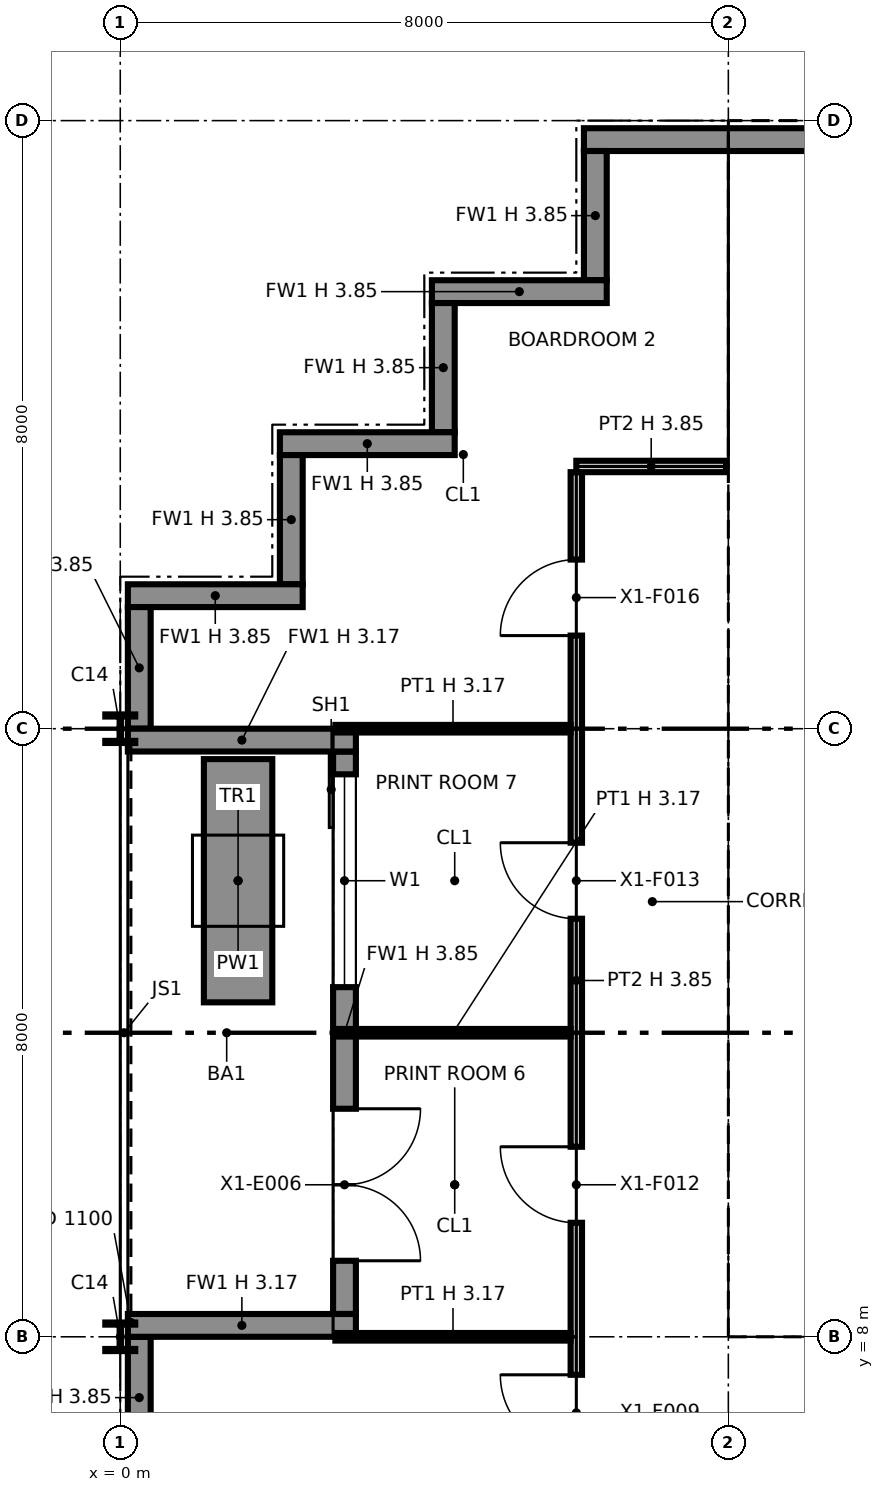
"""IFC4 building model, lengths in metres.
Left out: names, types, materials, properties, quantities, classifications, styles, units other than length and angle.
Written with IfcOpenShell. Run it as: python <this file> out.ifc"""

import sys

from ifc_helpers import new_model, si_unit, direction, frame, frame_2d, origin, origin_2d, place, context, subcontext, project, spatial, polyline, rectangle, i_section, outline, extrude, element, fill, save


model = new_model("IFC4")
c1 = context("Model", 3, precision=1e-05, world=origin(), true_north=direction((0.0, 1.0)))
c2 = subcontext(c1, "Body", "Model", "MODEL_VIEW")
j1 = project(units=[si_unit("LENGTHUNIT", "METRE"), si_unit("PLANEANGLEUNIT", "RADIAN")], contexts=[c1])
p1 = place(None, origin())
s1 = spatial("IfcSite", under=j1, at=p1, CompositionType="ELEMENT")
p2 = place(p1, origin())
s2 = spatial("IfcBuilding", under=s1, at=p2, CompositionType="ELEMENT")
p3 = place(p2, frame((0.0, 0.0, 251.0)))
s3 = spatial("IfcBuildingStorey", under=s2, at=p3, CompositionType="ELEMENT", Elevation=251.0)
for number, where, z_axis, x_axis in (
    (1, (0.0, 8.0, 0.0), (0.0, 0.0, 1.0), (1.0, 0.0, 0.0)),
    (2, (0.0, 16.0, 0.0), (0.0, 0.0, 1.0), (1.0, 0.0, 0.0)),
):
    element("IfcColumn", number, at=place(p3, frame(where, z_axis=z_axis, x_axis=x_axis)), inside=s3, PredefinedType="COLUMN", context=c2, shape_type="SweptSolid", body=[
        extrude(i_section(OverallWidth=0.394, OverallDepth=0.376, WebThickness=0.017, FlangeThickness=0.028, at=origin_2d()), origin(), (0.0, 0.0, 1.0), 3.85),
    ])
for number, where, z_axis, x_axis in (
    (3, (8.0, 8.0, 0.0), (0.0, 0.0, 1.0), (1.0, 0.0, 0.0)),
    (4, (8.0, 16.0, 0.0), (0.0, 0.0, 1.0), (1.0, 0.0, 0.0)),
):
    element("IfcColumn", number, at=place(p3, frame(where, z_axis=z_axis, x_axis=x_axis)), inside=s3, PredefinedType="COLUMN", context=c2, shape_type="SweptSolid", body=[
        extrude(i_section(OverallWidth=0.371, OverallDepth=0.361, WebThickness=0.012, FlangeThickness=0.02, at=origin_2d()), origin(), (0.0, 0.0, 1.0), 3.85),
    ])
p4 = place(p3, frame((8.0, 24.0, 0.0), z_axis=(0.0, 0.0, 1.0), x_axis=(1.0, 0.0, 0.0)))
e5 = element("IfcColumn", 5, at=p4, inside=s3, PredefinedType="COLUMN", context=c2, shape_type="SweptSolid", body=[
    extrude(i_section(OverallWidth=0.401, OverallDepth=0.399, WebThickness=0.025, FlangeThickness=0.04, at=origin_2d()), origin(), (0.0, 0.0, 1.0), 3.85),
])
p5 = place(p3, frame((32.0, 23.75, 0.0), z_axis=(0.0, 0.0, 1.0), x_axis=(-1.0, 0.0, 0.0)))
e6 = element("IfcWall", 6, at=p5, inside=s3, PredefinedType="SOLIDWALL", context=c2, shape_type="SweptSolid", body=[
    extrude(rectangle(XDim=25.9, YDim=0.3, at=frame_2d((12.95, 0.0))), origin(), (0.0, 0.0, 1.0), 3.85),
])
p6 = place(p3, frame((6.25, 23.6, 0.0), z_axis=(0.0, 0.0, 1.0), x_axis=(0.0, -1.0, 0.0)))
e7 = element("IfcWall", 7, at=p6, inside=s3, PredefinedType="SOLIDWALL", context=c2, shape_type="SweptSolid", body=[
    extrude(rectangle(XDim=1.7, YDim=0.3, at=frame_2d((0.85, 0.0))), origin(), (0.0, 0.0, 1.0), 3.85),
])
p7 = place(p3, frame((6.4, 21.75, 0.0), z_axis=(0.0, 0.0, 1.0), x_axis=(-1.0, 0.0, 0.0)))
e8 = element("IfcWall", 8, at=p7, inside=s3, PredefinedType="SOLIDWALL", context=c2, shape_type="SweptSolid", body=[
    extrude(rectangle(XDim=2.3, YDim=0.3, at=frame_2d((1.15, 0.0))), origin(), (0.0, 0.0, 1.0), 3.85),
])
p8 = place(p3, frame((4.25, 21.6, 0.0), z_axis=(0.0, 0.0, 1.0), x_axis=(0.0, -1.0, 0.0)))
e9 = element("IfcWall", 9, at=p8, inside=s3, PredefinedType="SOLIDWALL", context=c2, shape_type="SweptSolid", body=[
    extrude(rectangle(XDim=1.7, YDim=0.3, at=frame_2d((0.85, 0.0))), origin(), (0.0, 0.0, 1.0), 3.85),
])
p9 = place(p3, frame((4.4, 19.75, 0.0), z_axis=(0.0, 0.0, 1.0), x_axis=(-1.0, 0.0, 0.0)))
e10 = element("IfcWall", 10, at=p9, inside=s3, PredefinedType="SOLIDWALL", context=c2, shape_type="SweptSolid", body=[
    extrude(rectangle(XDim=2.3, YDim=0.3, at=frame_2d((1.15, 0.0))), origin(), (0.0, 0.0, 1.0), 3.85),
])
p10 = place(p3, frame((2.25, 19.6, 0.0), z_axis=(0.0, 0.0, 1.0), x_axis=(0.0, -1.0, 0.0)))
e11 = element("IfcWall", 11, at=p10, inside=s3, PredefinedType="SOLIDWALL", context=c2, shape_type="SweptSolid", body=[
    extrude(rectangle(XDim=1.7, YDim=0.3, at=frame_2d((0.85, 0.0))), origin(), (0.0, 0.0, 1.0), 3.85),
])
p11 = place(p3, frame((2.4, 17.75, 0.0), z_axis=(0.0, 0.0, 1.0), x_axis=(-1.0, 0.0, 0.0)))
e12 = element("IfcWall", 12, at=p11, inside=s3, PredefinedType="SOLIDWALL", context=c2, shape_type="SweptSolid", body=[
    extrude(rectangle(XDim=2.3, YDim=0.3, at=frame_2d((1.15, 0.0))), origin(), (0.0, 0.0, 1.0), 3.85),
])
p12 = place(p3, frame((0.25, 17.6, 0.0), z_axis=(0.0, 0.0, 1.0), x_axis=(0.0, -1.0, 0.0)))
e13 = element("IfcWall", 13, at=p12, inside=s3, PredefinedType="SOLIDWALL", context=c2, shape_type="SweptSolid", body=[
    extrude(rectangle(XDim=1.6, YDim=0.3, at=frame_2d((0.8, 0.0))), origin(), (0.0, 0.0, 1.0), 3.85),
])
p13 = place(p3, frame((2.95, 15.7, 0.0), z_axis=(0.0, 0.0, 1.0), x_axis=(0.0, -1.0, 0.0)))
e14 = element("IfcWall", 14, at=p13, inside=s3, PredefinedType="SOLIDWALL", context=c2, shape_type="SweptSolid", body=[
    extrude(rectangle(XDim=7.4, YDim=0.3, at=frame_2d((3.7, 0.0))), origin(), (0.0, 0.0, 1.0), 3.85),
])
p14 = place(p13, frame((0.3, 0.0, 0.9)))
e15 = element("IfcOpeningElement", 15, at=p14, cuts=e14, PredefinedType="OPENING", context=c2, shape_type="SweptSolid", body=[
    extrude(rectangle(XDim=2.8, YDim=2.2, at=frame_2d((1.4, 1.1))), frame((0.0, 0.16, 0.0), z_axis=(0.0, -1.0, 0.0), x_axis=(1.0, 0.0, 0.0)), (0.0, 0.0, 1.0), 0.32),
])
p15 = place(p13, frame((4.7, 0.0, 0.0)))
e16 = element("IfcOpeningElement", 16, at=p15, cuts=e14, PredefinedType="OPENING", context=c2, shape_type="SweptSolid", body=[
    extrude(rectangle(XDim=2.0, YDim=2.4, at=frame_2d((1.0, 1.2))), frame((0.0, 0.16, 0.0), z_axis=(0.0, -1.0, 0.0), x_axis=(1.0, 0.0, 0.0)), (0.0, 0.0, 1.0), 0.32),
])
for number, where, z_axis, x_axis in (
    (17, (0.1, 15.85, 0.0), (0.0, 0.0, 1.0), (1.0, 0.0, 0.0)),
    (18, (0.1, 8.15, 0.0), (0.0, 0.0, 1.0), (1.0, 0.0, 0.0)),
):
    element("IfcWall", number, at=place(p3, frame(where, z_axis=z_axis, x_axis=x_axis)), inside=s3, PredefinedType="SOLIDWALL", context=c2, shape_type="SweptSolid", body=[
        extrude(rectangle(XDim=3.0, YDim=0.3, at=frame_2d((1.5, 0.0))), origin(), (0.0, 0.0, 1.0), 3.171),
    ])
p16 = place(p3, frame((0.25, 8.0, 0.0), z_axis=(0.0, 0.0, 1.0), x_axis=(0.0, -1.0, 0.0)))
e19 = element("IfcWall", 19, at=p16, inside=s3, PredefinedType="SOLIDWALL", context=c2, shape_type="SweptSolid", body=[
    extrude(rectangle(XDim=1.6, YDim=0.3, at=frame_2d((0.8, 0.0))), origin(), (0.0, 0.0, 1.0), 3.85),
])
p17 = place(p3, frame((1.55, 15.6, 0.0), z_axis=(0.0, 0.0, 1.0), x_axis=(0.0, -1.0, 0.0)))
e20 = element("IfcWall", 20, at=p17, inside=s3, PredefinedType="SOLIDWALL", context=c2, shape_type="SweptSolid", body=[
    extrude(rectangle(XDim=3.2, YDim=0.9, at=frame_2d((1.6, 0.0))), origin(), (0.0, 0.0, 1.0), 0.6),
])
p18 = place(p3, frame((8.65, 8.75, 0.0), z_axis=(0.0, 0.0, 1.0), x_axis=(1.0, 0.0, 0.0)))
e21 = element("IfcWall", 21, at=p18, inside=s3, PredefinedType="PARTITIONING", context=c2, shape_type="SweptSolid", body=[
    extrude(outline(polyline([(0.0, 0.0), (14.7, 0.0), (14.7, 3.85), (7.438, 3.85), (7.438, 3.308), (7.262, 3.308), (7.261, 3.85), (0.0, 3.85), (0.0, 0.0)])), frame((0.0, 0.1, 0.0), z_axis=(0.0, -1.0, 0.0), x_axis=(1.0, 0.0, 0.0)), (0.0, 0.0, 1.0), 0.2),
])
p19 = place(p18, frame((1.3, 0.0, 0.0)))
e22 = element("IfcOpeningElement", 22, at=p19, cuts=e21, PredefinedType="OPENING", context=c2, shape_type="SweptSolid", body=[
    extrude(rectangle(XDim=1.4, YDim=2.1, at=frame_2d((0.7, 1.05))), frame((0.0, 0.11, 0.0), z_axis=(0.0, -1.0, 0.0), x_axis=(1.0, 0.0, 0.0)), (0.0, 0.0, 1.0), 0.22),
])
p20 = place(p18, frame((4.6, 0.0, 0.0)))
e23 = element("IfcOpeningElement", 23, at=p20, cuts=e21, PredefinedType="OPENING", context=c2, shape_type="SweptSolid", body=[
    extrude(rectangle(XDim=1.4, YDim=2.1, at=frame_2d((0.7, 1.05))), frame((0.0, 0.11, 0.0), z_axis=(0.0, -1.0, 0.0), x_axis=(1.0, 0.0, 0.0)), (0.0, 0.0, 1.0), 0.22),
])
p21 = place(p18, frame((10.4, 0.0, 0.0)))
e24 = element("IfcOpeningElement", 24, at=p21, cuts=e21, PredefinedType="OPENING", context=c2, shape_type="SweptSolid", body=[
    extrude(rectangle(XDim=1.2, YDim=2.1, at=frame_2d((0.6, 1.05))), frame((0.0, 0.11, 0.0), z_axis=(0.0, -1.0, 0.0), x_axis=(1.0, 0.0, 0.0)), (0.0, 0.0, 1.0), 0.22),
])
p22 = place(p3, frame((8.75, 8.85, 0.0), z_axis=(0.0, 0.0, 1.0), x_axis=(0.0, 1.0, 0.0)))
e25 = element("IfcWall", 25, at=p22, inside=s3, PredefinedType="PARTITIONING", context=c2, shape_type="SweptSolid", body=[
    extrude(outline(polyline([(0.0, 0.0), (14.3, 0.0), (14.3, 3.85), (10.225, 3.85), (10.224, 3.44), (10.076, 3.44), (10.075, 3.85), (7.239, 3.85), (7.238, 3.308), (7.062, 3.308), (7.062, 3.85), (0.0, 3.85), (0.0, 0.0)])), frame((0.0, 0.1, 0.0), z_axis=(0.0, -1.0, 0.0), x_axis=(1.0, 0.0, 0.0)), (0.0, 0.0, 1.0), 0.2),
])
p23 = place(p22, frame((8.3, 0.0, 0.0)))
e26 = element("IfcOpeningElement", 26, at=p23, cuts=e25, PredefinedType="OPENING", context=c2, shape_type="SweptSolid", body=[
    extrude(rectangle(XDim=1.8, YDim=2.1, at=frame_2d((0.9, 1.05))), frame((0.0, 0.11, 0.0), z_axis=(0.0, -1.0, 0.0), x_axis=(1.0, 0.0, 0.0)), (0.0, 0.0, 1.0), 0.22),
])
p24 = place(p3, frame((8.65, 23.25, 0.0), z_axis=(0.0, 0.0, 1.0), x_axis=(1.0, 0.0, 0.0)))
e27 = element("IfcWall", 27, at=p24, inside=s3, PredefinedType="PARTITIONING", context=c2, shape_type="SweptSolid", body=[
    extrude(outline(polyline([(0.0, 0.0), (14.7, 0.0), (14.7, 3.85), (7.438, 3.85), (7.438, 3.308), (7.262, 3.308), (7.261, 3.85), (0.0, 3.85), (0.0, 0.0)])), frame((0.0, 0.1, 0.0), z_axis=(0.0, -1.0, 0.0), x_axis=(1.0, 0.0, 0.0)), (0.0, 0.0, 1.0), 0.2),
])
p25 = place(p3, frame((8.85, 16.0, 0.0), z_axis=(0.0, 0.0, 1.0), x_axis=(1.0, 0.0, 0.0)))
e28 = element("IfcWall", 28, at=p25, inside=s3, PredefinedType="PARTITIONING", context=c2, shape_type="SweptSolid", body=[
    extrude(rectangle(XDim=6.954, YDim=0.6, at=frame_2d((3.477, 0.0))), origin(), (0.0, 0.0, 1.0), 3.308),
])
p26 = place(p3, frame((8.85, 19.9, 0.0), z_axis=(0.0, 0.0, 1.0), x_axis=(1.0, 0.0, 0.0)))
e29 = element("IfcWall", 29, at=p26, inside=s3, PredefinedType="PARTITIONING", context=c2, shape_type="SweptSolid", body=[
    extrude(outline(polyline([(0.0, 0.0), (14.3, 0.0), (14.3, 3.85), (7.239, 3.85), (7.238, 3.308), (7.062, 3.308), (7.062, 3.85), (0.0, 3.85), (0.0, 0.0)])), frame((0.0, 0.1, 0.0), z_axis=(0.0, -1.0, 0.0), x_axis=(1.0, 0.0, 0.0)), (0.0, 0.0, 1.0), 0.2),
])
p27 = place(p26, frame((2.125, 0.0, 0.0)))
e30 = element("IfcOpeningElement", 30, at=p27, cuts=e29, PredefinedType="OPENING", context=c2, shape_type="SweptSolid", body=[
    extrude(rectangle(XDim=0.9, YDim=2.1, at=frame_2d((0.45, 1.05))), frame((0.0, 0.11, 0.0), z_axis=(0.0, -1.0, 0.0), x_axis=(1.0, 0.0, 0.0)), (0.0, 0.0, 1.0), 0.22),
])
p28 = place(p26, frame((5.65, 0.0, 0.0)))
e31 = element("IfcOpeningElement", 31, at=p28, cuts=e29, PredefinedType="OPENING", context=c2, shape_type="SweptSolid", body=[
    extrude(rectangle(XDim=1.1, YDim=2.1, at=frame_2d((0.55, 1.05))), frame((0.0, 0.11, 0.0), z_axis=(0.0, -1.0, 0.0), x_axis=(1.0, 0.0, 0.0)), (0.0, 0.0, 1.0), 0.22),
])
p29 = place(p26, frame((7.95, 0.0, 0.0)))
e32 = element("IfcOpeningElement", 32, at=p29, cuts=e29, PredefinedType="OPENING", context=c2, shape_type="SweptSolid", body=[
    extrude(rectangle(XDim=1.1, YDim=2.1, at=frame_2d((0.55, 1.05))), frame((0.0, 0.11, 0.0), z_axis=(0.0, -1.0, 0.0), x_axis=(1.0, 0.0, 0.0)), (0.0, 0.0, 1.0), 0.22),
])
p30 = place(p26, frame((10.25, 0.0, 0.0)))
e33 = element("IfcOpeningElement", 33, at=p30, cuts=e29, PredefinedType="OPENING", context=c2, shape_type="SweptSolid", body=[
    extrude(rectangle(XDim=1.1, YDim=2.1, at=frame_2d((0.55, 1.05))), frame((0.0, 0.11, 0.0), z_axis=(0.0, -1.0, 0.0), x_axis=(1.0, 0.0, 0.0)), (0.0, 0.0, 1.0), 0.22),
])
p31 = place(p26, frame((12.625, 0.0, 0.0)))
e34 = element("IfcOpeningElement", 34, at=p31, cuts=e29, PredefinedType="OPENING", context=c2, shape_type="SweptSolid", body=[
    extrude(rectangle(XDim=1.1, YDim=2.1, at=frame_2d((0.55, 1.05))), frame((0.0, 0.11, 0.0), z_axis=(0.0, -1.0, 0.0), x_axis=(1.0, 0.0, 0.0)), (0.0, 0.0, 1.0), 0.22),
])
p32 = place(p3, frame((6.0, 6.0, 0.0), z_axis=(0.0, 0.0, 1.0), x_axis=(0.0, 1.0, 0.0)))
e35 = element("IfcWall", 35, at=p32, inside=s3, PredefinedType="PARTITIONING", context=c2, shape_type="SweptSolid", body=[
    extrude(outline(polyline([(0.0, 0.0), (13.375, 0.0), (13.375, 3.85), (10.3, 3.85), (10.298, 3.172), (9.702, 3.172), (9.7, 3.85), (6.3, 3.85), (6.298, 3.172), (5.702, 3.172), (5.7, 3.85), (2.3, 3.85), (2.298, 3.172), (1.702, 3.172), (1.7, 3.85), (0.0, 3.85), (0.0, 0.0)])), frame((0.0, 0.075, 0.0), z_axis=(0.0, -1.0, 0.0), x_axis=(1.0, 0.0, 0.0)), (0.0, 0.0, 1.0), 0.15),
])
p33 = place(p32, frame((0.5, 0.0, 0.0)))
e36 = element("IfcOpeningElement", 36, at=p33, cuts=e35, PredefinedType="OPENING", context=c2, shape_type="SweptSolid", body=[
    extrude(rectangle(XDim=1.0, YDim=2.1, at=frame_2d((0.5, 1.05))), frame((0.0, 0.085, 0.0), z_axis=(0.0, -1.0, 0.0), x_axis=(1.0, 0.0, 0.0)), (0.0, 0.0, 1.0), 0.17),
])
p34 = place(p32, frame((3.5, 0.0, 0.0)))
e37 = element("IfcOpeningElement", 37, at=p34, cuts=e35, PredefinedType="OPENING", context=c2, shape_type="SweptSolid", body=[
    extrude(rectangle(XDim=1.0, YDim=2.1, at=frame_2d((0.5, 1.05))), frame((0.0, 0.085, 0.0), z_axis=(0.0, -1.0, 0.0), x_axis=(1.0, 0.0, 0.0)), (0.0, 0.0, 1.0), 0.17),
])
p35 = place(p32, frame((7.5, 0.0, 0.0)))
e38 = element("IfcOpeningElement", 38, at=p35, cuts=e35, PredefinedType="OPENING", context=c2, shape_type="SweptSolid", body=[
    extrude(rectangle(XDim=1.0, YDim=2.1, at=frame_2d((0.5, 1.05))), frame((0.0, 0.085, 0.0), z_axis=(0.0, -1.0, 0.0), x_axis=(1.0, 0.0, 0.0)), (0.0, 0.0, 1.0), 0.17),
])
p36 = place(p32, frame((11.225, 0.0, 0.0)))
e39 = element("IfcOpeningElement", 39, at=p36, cuts=e35, PredefinedType="OPENING", context=c2, shape_type="SweptSolid", body=[
    extrude(rectangle(XDim=1.0, YDim=2.1, at=frame_2d((0.5, 1.05))), frame((0.0, 0.085, 0.0), z_axis=(0.0, -1.0, 0.0), x_axis=(1.0, 0.0, 0.0)), (0.0, 0.0, 1.0), 0.17),
])
for number, where, z_axis, x_axis in (
    (40, (2.83, 8.0, 0.0), (0.0, 0.0, 1.0), (1.0, 0.0, 0.0)),
    (41, (2.83, 12.0, 0.0), (0.0, 0.0, 1.0), (1.0, 0.0, 0.0)),
    (42, (2.83, 16.0, 0.0), (0.0, 0.0, 1.0), (1.0, 0.0, 0.0)),
):
    element("IfcWall", number, at=place(p3, frame(where, z_axis=z_axis, x_axis=x_axis)), inside=s3, PredefinedType="PARTITIONING", context=c2, shape_type="SweptSolid", body=[
        extrude(rectangle(XDim=3.095, YDim=0.1, at=frame_2d((1.547, 0.0))), origin(), (0.0, 0.0, 1.0), 3.172),
    ])
p37 = place(p3, frame((6.0, 19.45, 0.0), z_axis=(0.0, 0.0, 1.0), x_axis=(1.0, 0.0, 0.0)))
e43 = element("IfcWall", 43, at=p37, inside=s3, PredefinedType="PARTITIONING", context=c2, shape_type="SweptSolid", body=[
    extrude(rectangle(XDim=1.97, YDim=0.15, at=frame_2d((0.985, 0.0))), origin(), (0.0, 0.0, 1.0), 3.85),
])
p38 = place(p14, origin())
e44 = element("IfcWindow", 44, at=p38, inside=s3, PartitioningType="SINGLE_PANEL", PredefinedType="WINDOW", context=c2, shape_type="SweptSolid", body=[
    extrude(rectangle(XDim=2.8, YDim=2.2, at=frame_2d((1.4, 1.1))), frame((0.0, 0.03, 0.0), z_axis=(0.0, -1.0, 0.0), x_axis=(1.0, 0.0, 0.0)), (0.0, 0.0, 1.0), 0.06),
])
fill(e15, e44)
p39 = place(p15, origin())
e45 = element("IfcDoor", 45, at=p39, inside=s3, OperationType="DOUBLE_DOOR_SINGLE_SWING", PredefinedType="DOOR", context=c2, shape_type="SweptSolid", body=[
    extrude(rectangle(XDim=2.0, YDim=2.4, at=frame_2d((1.0, 1.2))), frame((0.0, 0.025, 0.0), z_axis=(0.0, -1.0, 0.0), x_axis=(1.0, 0.0, 0.0)), (0.0, 0.0, 1.0), 0.05),
])
fill(e16, e45)
p40 = place(p23, origin())
e46 = element("IfcDoor", 46, at=p40, inside=s3, OperationType="DOUBLE_DOOR_SINGLE_SWING", PredefinedType="NOTDEFINED", context=c2, shape_type="SweptSolid", body=[
    extrude(rectangle(XDim=1.8, YDim=2.1, at=frame_2d((0.9, 1.05))), frame((0.0, 0.025, 0.0), z_axis=(0.0, -1.0, 0.0), x_axis=(1.0, 0.0, 0.0)), (0.0, 0.0, 1.0), 0.05),
])
fill(e26, e46)
p41 = place(p33, origin())
e47 = element("IfcDoor", 47, at=p41, inside=s3, OperationType="SINGLE_SWING_RIGHT", PredefinedType="DOOR", context=c2, shape_type="SweptSolid", body=[
    extrude(rectangle(XDim=1.0, YDim=2.1, at=frame_2d((0.5, 1.05))), frame((0.0, 0.025, 0.0), z_axis=(0.0, -1.0, 0.0), x_axis=(1.0, 0.0, 0.0)), (0.0, 0.0, 1.0), 0.05),
])
fill(e36, e47)
p42 = place(p34, origin())
e48 = element("IfcDoor", 48, at=p42, inside=s3, OperationType="SINGLE_SWING_RIGHT", PredefinedType="DOOR", context=c2, shape_type="SweptSolid", body=[
    extrude(rectangle(XDim=1.0, YDim=2.1, at=frame_2d((0.5, 1.05))), frame((0.0, 0.025, 0.0), z_axis=(0.0, -1.0, 0.0), x_axis=(1.0, 0.0, 0.0)), (0.0, 0.0, 1.0), 0.05),
])
fill(e37, e48)
p43 = place(p35, origin())
e49 = element("IfcDoor", 49, at=p43, inside=s3, OperationType="SINGLE_SWING_RIGHT", PredefinedType="DOOR", context=c2, shape_type="SweptSolid", body=[
    extrude(rectangle(XDim=1.0, YDim=2.1, at=frame_2d((0.5, 1.05))), frame((0.0, 0.025, 0.0), z_axis=(0.0, -1.0, 0.0), x_axis=(1.0, 0.0, 0.0)), (0.0, 0.0, 1.0), 0.05),
])
fill(e38, e49)
p44 = place(p36, origin())
e50 = element("IfcDoor", 50, at=p44, inside=s3, OperationType="SINGLE_SWING_LEFT", PredefinedType="DOOR", context=c2, shape_type="SweptSolid", body=[
    extrude(rectangle(XDim=1.0, YDim=2.1, at=frame_2d((0.5, 1.05))), frame((0.0, 0.025, 0.0), z_axis=(0.0, -1.0, 0.0), x_axis=(1.0, 0.0, 0.0)), (0.0, 0.0, 1.0), 0.05),
])
fill(e39, e50)
save(model, sys.argv[1])
